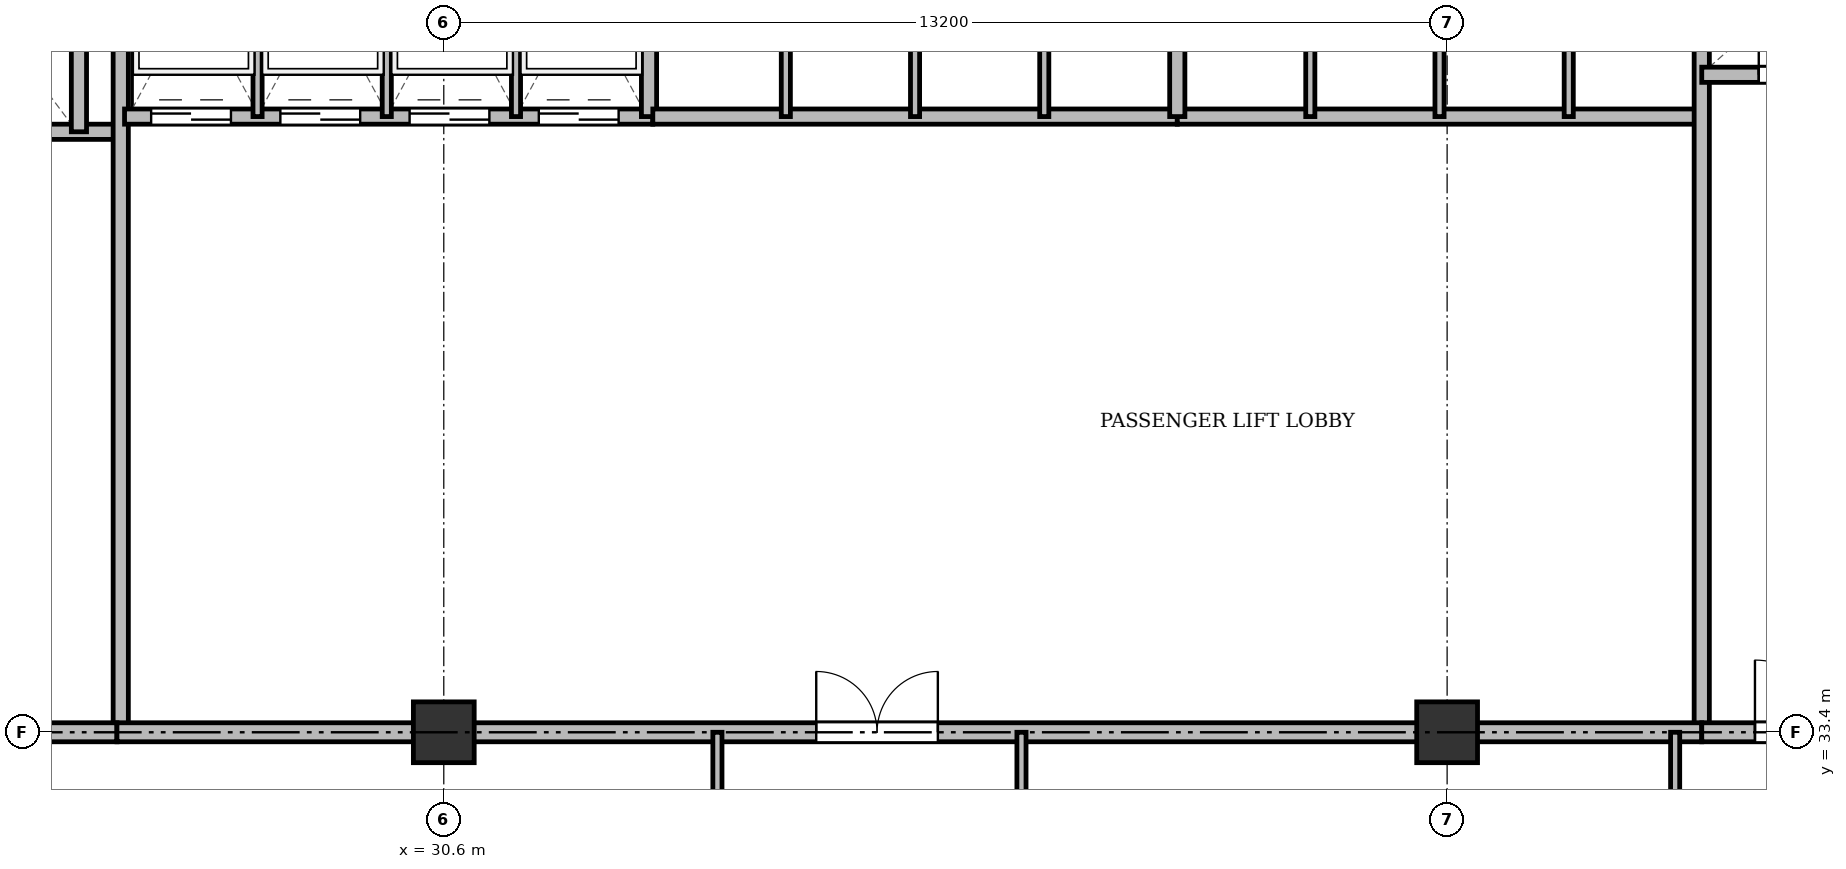
"""IFC4 building model, lengths in metres.
Left out: names, types, materials, properties, quantities, classifications, styles, units other than length and angle.
Written with IfcOpenShell. Run it as: python <this file> out.ifc"""

import sys

from ifc_helpers import new_model, si_unit, direction, frame, frame_2d, origin, origin_2d, place, context, subcontext, project, spatial, rectangle, extrude, source, transform, mapped, element, fill, save


model = new_model("IFC4")
c1 = context("Model", 3, precision=1e-05, world=origin(), true_north=direction((0.0, 1.0)))
c2 = subcontext(c1, "Body", "Model", "MODEL_VIEW")
j1 = project(units=[si_unit("LENGTHUNIT", "METRE"), si_unit("PLANEANGLEUNIT", "RADIAN")], contexts=[c1])
p1 = place(None, origin())
s1 = spatial("IfcSite", under=j1, at=p1, CompositionType="ELEMENT")
p2 = place(p1, origin())
s2 = spatial("IfcBuilding", under=s1, at=p2, CompositionType="ELEMENT")
p3 = place(p2, frame((0.0, 0.0, 121.3)))
s3 = spatial("IfcBuildingStorey", under=s2, at=p3, CompositionType="ELEMENT", Elevation=121.3)
m1 = source(origin(), c2, "Body", "SweptSolid", [
    extrude(rectangle(XDim=0.8, YDim=0.8, at=origin_2d()), origin(), (0.0, 0.0, 1.0), 3.6),
])
for number, where, z_axis, x_axis in (
    (1, (30.6, 33.4, 0.0), (0.0, 0.0, 1.0), (1.0, 0.0, 0.0)),
    (2, (43.8, 33.4, 0.0), (0.0, 0.0, 1.0), (1.0, 0.0, 0.0)),
):
    element("IfcColumn", number, at=place(p3, frame(where, z_axis=z_axis, x_axis=x_axis)), inside=s3, PredefinedType="COLUMN", context=c2, shape_type="MappedRepresentation", body=[
        mapped(m1, transform((0.0, 0.0, 0.0), x_axis=(1.0, 0.0, 0.0), y_axis=(0.0, 1.0, 0.0), z_axis=(0.0, 0.0, 1.0), scale=1.0)),
    ])
p4 = place(p3, frame((19.55, 41.3, 0.0), z_axis=(0.0, 0.0, 1.0), x_axis=(1.0, 0.0, 0.0)))
e3 = element("IfcWall", 3, at=p4, inside=s3, PredefinedType="SOLIDWALL", context=c2, shape_type="SweptSolid", body=[
    extrude(rectangle(XDim=6.75, YDim=0.2, at=frame_2d((3.375, 0.0))), origin(), (0.0, 0.0, 1.0), 3.34),
])
p5 = place(p4, frame((1.7, 0.0, 0.0)))
e4 = element("IfcOpeningElement", 4, at=p5, cuts=e3, PredefinedType="OPENING", context=c2, shape_type="SweptSolid", body=[
    extrude(rectangle(XDim=1.1, YDim=2.15, at=frame_2d((0.55, 1.075))), frame((0.0, 0.11, 0.0), z_axis=(0.0, -1.0, 0.0), x_axis=(1.0, 0.0, 0.0)), (0.0, 0.0, 1.0), 0.22),
])
p6 = place(p4, frame((4.4, 0.0, 0.0)))
e5 = element("IfcOpeningElement", 5, at=p6, cuts=e3, PredefinedType="OPENING", context=c2, shape_type="SweptSolid", body=[
    extrude(rectangle(XDim=1.1, YDim=2.15, at=frame_2d((0.55, 1.075))), frame((0.0, 0.11, 0.0), z_axis=(0.0, -1.0, 0.0), x_axis=(1.0, 0.0, 0.0)), (0.0, 0.0, 1.0), 0.22),
])
p7 = place(p3, frame((25.8, 41.3, 0.0), z_axis=(0.0, 0.0, 1.0), x_axis=(0.0, 1.0, 0.0)))
e6 = element("IfcWall", 6, at=p7, inside=s3, PredefinedType="SOLIDWALL", context=c2, shape_type="SweptSolid", body=[
    extrude(rectangle(XDim=3.4, YDim=0.2, at=frame_2d((1.7, 0.0))), origin(), (0.0, 0.0, 1.0), 3.34),
])
p8 = place(p3, frame((26.35, 33.4, 0.0), z_axis=(0.0, 0.0, 1.0), x_axis=(0.0, 1.0, 0.0)))
e7 = element("IfcWall", 7, at=p8, inside=s3, PredefinedType="SOLIDWALL", context=c2, shape_type="SweptSolid", body=[
    extrude(rectangle(XDim=11.3, YDim=0.2, at=frame_2d((5.65, 0.0))), origin(), (0.0, 0.0, 1.0), 2.752),
])
p9 = place(p3, frame((19.5, 33.4, 0.0), z_axis=(0.0, 0.0, 1.0), x_axis=(1.0, 0.0, 0.0)))
e8 = element("IfcWall", 8, at=p9, inside=s3, PredefinedType="PARTITIONING", context=c2, shape_type="SweptSolid", body=[
    extrude(rectangle(XDim=6.8, YDim=0.25, at=frame_2d((3.4, 0.0))), origin(), (0.0, 0.0, 1.0), 2.752),
])
p10 = place(p9, frame((0.75, 0.0, 0.0)))
e9 = element("IfcOpeningElement", 9, at=p10, cuts=e8, PredefinedType="OPENING", context=c2, shape_type="SweptSolid", body=[
    extrude(rectangle(XDim=1.6, YDim=2.2, at=frame_2d((0.8, 1.1))), frame((0.0, 0.135, 0.0), z_axis=(0.0, -1.0, 0.0), x_axis=(1.0, 0.0, 0.0)), (0.0, 0.0, 1.0), 0.27),
])
p11 = place(p3, frame((26.4, 41.5, 0.0), z_axis=(0.0, 0.0, 1.0), x_axis=(1.0, 0.0, 0.0)))
e10 = element("IfcWall", 10, at=p11, inside=s3, PredefinedType="SOLIDWALL", context=c2, shape_type="SweptSolid", body=[
    extrude(rectangle(XDim=6.95, YDim=0.2, at=frame_2d((3.475, 0.0))), origin(), (0.0, 0.0, 1.0), 3.34),
])
p12 = place(p11, frame((0.35, 0.0, 0.0)))
e11 = element("IfcOpeningElement", 11, at=p12, cuts=e10, PredefinedType="OPENING", context=c2, shape_type="SweptSolid", body=[
    extrude(rectangle(XDim=1.05, YDim=2.15, at=frame_2d((0.525, 1.075))), frame((0.0, 0.11, 0.0), z_axis=(0.0, -1.0, 0.0), x_axis=(1.0, 0.0, 0.0)), (0.0, 0.0, 1.0), 0.22),
])
p13 = place(p11, frame((2.05, 0.0, 0.0)))
e12 = element("IfcOpeningElement", 12, at=p13, cuts=e10, PredefinedType="OPENING", context=c2, shape_type="SweptSolid", body=[
    extrude(rectangle(XDim=1.05, YDim=2.15, at=frame_2d((0.525, 1.075))), frame((0.0, 0.11, 0.0), z_axis=(0.0, -1.0, 0.0), x_axis=(1.0, 0.0, 0.0)), (0.0, 0.0, 1.0), 0.22),
])
p14 = place(p11, frame((3.75, 0.0, 0.0)))
e13 = element("IfcOpeningElement", 13, at=p14, cuts=e10, PredefinedType="OPENING", context=c2, shape_type="SweptSolid", body=[
    extrude(rectangle(XDim=1.05, YDim=2.15, at=frame_2d((0.525, 1.075))), frame((0.0, 0.11, 0.0), z_axis=(0.0, -1.0, 0.0), x_axis=(1.0, 0.0, 0.0)), (0.0, 0.0, 1.0), 0.22),
])
p15 = place(p11, frame((5.45, 0.0, 0.0)))
e14 = element("IfcOpeningElement", 14, at=p15, cuts=e10, PredefinedType="OPENING", context=c2, shape_type="SweptSolid", body=[
    extrude(rectangle(XDim=1.05, YDim=2.15, at=frame_2d((0.525, 1.075))), frame((0.0, 0.11, 0.0), z_axis=(0.0, -1.0, 0.0), x_axis=(1.0, 0.0, 0.0)), (0.0, 0.0, 1.0), 0.22),
])
p16 = place(p3, frame((33.3, 41.5, 0.0), z_axis=(0.0, 0.0, 1.0), x_axis=(0.0, 1.0, 0.0)))
e15 = element("IfcWall", 15, at=p16, inside=s3, PredefinedType="SOLIDWALL", context=c2, shape_type="SweptSolid", body=[
    extrude(rectangle(XDim=3.2, YDim=0.2, at=frame_2d((1.6, 0.0))), origin(), (0.0, 0.0, 1.0), 3.34),
])
for number, where, z_axis, x_axis in (
    (16, (28.15, 41.5, 0.0), (0.0, 0.0, 1.0), (0.0, 1.0, 0.0)),
    (17, (29.85, 41.5, 0.0), (0.0, 0.0, 1.0), (0.0, 1.0, 0.0)),
    (18, (31.55, 41.5, 0.0), (0.0, 0.0, 1.0), (0.0, 1.0, 0.0)),
):
    element("IfcWall", number, at=place(p3, frame(where, z_axis=z_axis, x_axis=x_axis)), inside=s3, PredefinedType="PARTITIONING", context=c2, shape_type="SweptSolid", body=[
        extrude(rectangle(XDim=3.2, YDim=0.12, at=frame_2d((1.6, 0.0))), origin(), (0.0, 0.0, 1.0), 3.34),
    ])
p17 = place(p3, frame((33.35, 41.5, 0.0), z_axis=(0.0, 0.0, 1.0), x_axis=(1.0, 0.0, 0.0)))
e19 = element("IfcWall", 19, at=p17, inside=s3, PredefinedType="SOLIDWALL", context=c2, shape_type="SweptSolid", body=[
    extrude(rectangle(XDim=6.9, YDim=0.2, at=frame_2d((3.45, 0.0))), origin(), (0.0, 0.0, 1.0), 3.34),
])
for number, where, z_axis, x_axis in (
    (20, (35.1, 41.5, 0.0), (0.0, 0.0, 1.0), (0.0, 1.0, 0.0)),
    (21, (36.8, 41.5, 0.0), (0.0, 0.0, 1.0), (0.0, 1.0, 0.0)),
    (22, (38.5, 41.5, 0.0), (0.0, 0.0, 1.0), (0.0, 1.0, 0.0)),
):
    element("IfcWall", number, at=place(p3, frame(where, z_axis=z_axis, x_axis=x_axis)), inside=s3, PredefinedType="PARTITIONING", context=c2, shape_type="SweptSolid", body=[
        extrude(rectangle(XDim=3.2, YDim=0.12, at=frame_2d((1.6, 0.0))), origin(), (0.0, 0.0, 1.0), 3.34),
    ])
p18 = place(p3, frame((40.25, 41.5, 0.0), z_axis=(0.0, 0.0, 1.0), x_axis=(1.0, 0.0, 0.0)))
e23 = element("IfcWall", 23, at=p18, inside=s3, PredefinedType="SOLIDWALL", context=c2, shape_type="SweptSolid", body=[
    extrude(rectangle(XDim=6.9, YDim=0.2, at=frame_2d((3.45, 0.0))), origin(), (0.0, 0.0, 1.0), 2.84),
])
p19 = place(p3, frame((40.25, 41.5, 0.0), z_axis=(0.0, 0.0, 1.0), x_axis=(0.0, 1.0, 0.0)))
e24 = element("IfcWall", 24, at=p19, inside=s3, PredefinedType="SOLIDWALL", context=c2, shape_type="SweptSolid", body=[
    extrude(rectangle(XDim=3.2, YDim=0.2, at=frame_2d((1.6, 0.0))), origin(), (0.0, 0.0, 1.0), 3.34),
])
p20 = place(p3, frame((42.0, 41.5, 0.0), z_axis=(0.0, 0.0, 1.0), x_axis=(0.0, 1.0, 0.0)))
e25 = element("IfcWall", 25, at=p20, inside=s3, PredefinedType="PARTITIONING", context=c2, shape_type="SweptSolid", body=[
    extrude(rectangle(XDim=3.2, YDim=0.12, at=frame_2d((1.6, 0.0))), origin(), (0.0, 0.0, 1.0), 3.34),
])
p21 = place(p3, frame((43.7, 41.5, 0.0), z_axis=(0.0, 0.0, 1.0), x_axis=(0.0, 1.0, 0.0)))
e26 = element("IfcWall", 26, at=p21, inside=s3, PredefinedType="PARTITIONING", context=c2, shape_type="SweptSolid", body=[
    extrude(rectangle(XDim=3.2, YDim=0.12, at=frame_2d((1.6, 0.0))), origin(), (0.0, 0.0, 1.0), 2.84),
])
p22 = place(p3, frame((45.4, 41.5, 0.0), z_axis=(0.0, 0.0, 1.0), x_axis=(0.0, 1.0, 0.0)))
e27 = element("IfcWall", 27, at=p22, inside=s3, PredefinedType="PARTITIONING", context=c2, shape_type="SweptSolid", body=[
    extrude(rectangle(XDim=3.2, YDim=0.12, at=frame_2d((1.6, 0.0))), origin(), (0.0, 0.0, 1.0), 3.34),
])
p23 = place(p3, frame((47.15, 33.4, 0.0), z_axis=(0.0, 0.0, 1.0), x_axis=(0.0, 1.0, 0.0)))
e28 = element("IfcWall", 28, at=p23, inside=s3, PredefinedType="SOLIDWALL", context=c2, shape_type="SweptSolid", body=[
    extrude(rectangle(XDim=11.3, YDim=0.2, at=frame_2d((5.65, 0.0))), origin(), (0.0, 0.0, 1.0), 2.752),
])
p24 = place(p3, frame((26.3, 33.4, 0.0), z_axis=(0.0, 0.0, 1.0), x_axis=(1.0, 0.0, 0.0)))
e29 = element("IfcWall", 29, at=p24, inside=s3, PredefinedType="PARTITIONING", context=c2, shape_type="SweptSolid", body=[
    extrude(rectangle(XDim=20.85, YDim=0.25, at=frame_2d((10.425, 0.0))), origin(), (0.0, 0.0, 1.0), 2.752),
])
p25 = place(p24, frame((9.2, 0.0, 0.0)))
e30 = element("IfcOpeningElement", 30, at=p25, cuts=e29, PredefinedType="OPENING", context=c2, shape_type="SweptSolid", body=[
    extrude(rectangle(XDim=1.6, YDim=2.2, at=frame_2d((0.8, 1.1))), frame((0.0, 0.135, 0.0), z_axis=(0.0, -1.0, 0.0), x_axis=(1.0, 0.0, 0.0)), (0.0, 0.0, 1.0), 0.27),
])
p26 = place(p3, frame((47.15, 42.05, 0.0), z_axis=(0.0, 0.0, 1.0), x_axis=(1.0, 0.0, 0.0)))
e31 = element("IfcWall", 31, at=p26, inside=s3, PredefinedType="SOLIDWALL", context=c2, shape_type="SweptSolid", body=[
    extrude(rectangle(XDim=7.85, YDim=0.2, at=frame_2d((3.925, 0.0))), origin(), (0.0, 0.0, 1.0), 2.84),
])
p27 = place(p26, frame((0.75, 0.0, 0.0)))
e32 = element("IfcOpeningElement", 32, at=p27, cuts=e31, PredefinedType="OPENING", context=c2, shape_type="SweptSolid", body=[
    extrude(rectangle(XDim=0.9, YDim=2.1, at=frame_2d((0.45, 1.05))), frame((0.0, 0.11, 0.0), z_axis=(0.0, -1.0, 0.0), x_axis=(1.0, 0.0, 0.0)), (0.0, 0.0, 1.0), 0.22),
])
p28 = place(p26, frame((3.85, 0.0, 0.0)))
e33 = element("IfcOpeningElement", 33, at=p28, cuts=e31, PredefinedType="OPENING", context=c2, shape_type="SweptSolid", body=[
    extrude(rectangle(XDim=0.9, YDim=2.1, at=frame_2d((0.45, 1.05))), frame((0.0, 0.11, 0.0), z_axis=(0.0, -1.0, 0.0), x_axis=(1.0, 0.0, 0.0)), (0.0, 0.0, 1.0), 0.22),
])
p29 = place(p3, frame((47.15, 33.4, 0.0), z_axis=(0.0, 0.0, 1.0), x_axis=(1.0, 0.0, 0.0)))
e34 = element("IfcWall", 34, at=p29, inside=s3, PredefinedType="PARTITIONING", context=c2, shape_type="SweptSolid", body=[
    extrude(rectangle(XDim=11.15, YDim=0.25, at=frame_2d((5.575, 0.0))), origin(), (0.0, 0.0, 1.0), 2.752),
])
p30 = place(p29, frame((0.7, 0.0, 0.0)))
e35 = element("IfcOpeningElement", 35, at=p30, cuts=e34, PredefinedType="OPENING", context=c2, shape_type="SweptSolid", body=[
    extrude(rectangle(XDim=0.95, YDim=2.15, at=frame_2d((0.475, 1.075))), frame((0.0, 0.135, 0.0), z_axis=(0.0, -1.0, 0.0), x_axis=(1.0, 0.0, 0.0)), (0.0, 0.0, 1.0), 0.27),
])
p31 = place(p29, frame((6.0, 0.0, 0.0)))
e36 = element("IfcOpeningElement", 36, at=p31, cuts=e34, PredefinedType="OPENING", context=c2, shape_type="SweptSolid", body=[
    extrude(rectangle(XDim=1.2, YDim=2.15, at=frame_2d((0.6, 1.075))), frame((0.0, 0.135, 0.0), z_axis=(0.0, -1.0, 0.0), x_axis=(1.0, 0.0, 0.0)), (0.0, 0.0, 1.0), 0.27),
])
for number, where, z_axis, x_axis in (
    (37, (34.2, 29.8, 0.0), (0.0, 0.0, 1.0), (0.0, 1.0, 0.0)),
    (38, (38.2, 29.8, 0.0), (0.0, 0.0, 1.0), (0.0, 1.0, 0.0)),
    (39, (46.8, 29.8, 0.0), (0.0, 0.0, 1.0), (0.0, 1.0, 0.0)),
):
    element("IfcWall", number, at=place(p3, frame(where, z_axis=z_axis, x_axis=x_axis)), inside=s3, PredefinedType="PARTITIONING", context=c2, shape_type="SweptSolid", body=[
        extrude(rectangle(XDim=3.6, YDim=0.12, at=frame_2d((1.8, 0.0))), origin(), (0.0, 0.0, 1.0), 2.752),
    ])
m2 = source(origin(), c2, "Body", "SweptSolid", [
    extrude(rectangle(XDim=1.05, YDim=2.15, at=frame_2d((0.525, 1.075))), frame((0.0, 0.025, 0.0), z_axis=(0.0, -1.0, 0.0), x_axis=(1.0, 0.0, 0.0)), (0.0, 0.0, 1.0), 0.05),
])
p32 = place(p12, origin())
e40 = element("IfcDoor", 40, at=p32, inside=s3, OperationType="DOUBLE_DOOR_SLIDING", PredefinedType="DOOR", context=c2, shape_type="MappedRepresentation", body=[
    mapped(m2, transform((0.0, 0.0, 0.0), x_axis=(1.0, 0.0, 0.0), y_axis=(0.0, 1.0, 0.0), z_axis=(0.0, 0.0, 1.0), scale=1.0)),
])
fill(e11, e40)
p33 = place(p13, origin())
e41 = element("IfcDoor", 41, at=p33, inside=s3, OperationType="DOUBLE_DOOR_SLIDING", PredefinedType="DOOR", context=c2, shape_type="MappedRepresentation", body=[
    mapped(m2, transform((0.0, 0.0, 0.0), x_axis=(1.0, 0.0, 0.0), y_axis=(0.0, 1.0, 0.0), z_axis=(0.0, 0.0, 1.0), scale=1.0)),
])
fill(e12, e41)
p34 = place(p14, origin())
e42 = element("IfcDoor", 42, at=p34, inside=s3, OperationType="DOUBLE_DOOR_SLIDING", PredefinedType="DOOR", context=c2, shape_type="MappedRepresentation", body=[
    mapped(m2, transform((0.0, 0.0, 0.0), x_axis=(1.0, 0.0, 0.0), y_axis=(0.0, 1.0, 0.0), z_axis=(0.0, 0.0, 1.0), scale=1.0)),
])
fill(e13, e42)
p35 = place(p15, origin())
e43 = element("IfcDoor", 43, at=p35, inside=s3, OperationType="DOUBLE_DOOR_SLIDING", PredefinedType="DOOR", context=c2, shape_type="MappedRepresentation", body=[
    mapped(m2, transform((0.0, 0.0, 0.0), x_axis=(1.0, 0.0, 0.0), y_axis=(0.0, 1.0, 0.0), z_axis=(0.0, 0.0, 1.0), scale=1.0)),
])
fill(e14, e43)
m3 = source(origin(), c2, "Body", "SweptSolid", [
    extrude(rectangle(XDim=1.6, YDim=2.2, at=frame_2d((0.8, 1.1))), frame((0.0, 0.025, 0.0), z_axis=(0.0, -1.0, 0.0), x_axis=(1.0, 0.0, 0.0)), (0.0, 0.0, 1.0), 0.05),
])
p36 = place(p25, origin())
e44 = element("IfcDoor", 44, at=p36, inside=s3, OperationType="DOUBLE_DOOR_SINGLE_SWING", PredefinedType="DOOR", context=c2, shape_type="MappedRepresentation", body=[
    mapped(m3, transform((0.0, 0.0, 0.0), x_axis=(1.0, 0.0, 0.0), y_axis=(0.0, 1.0, 0.0), z_axis=(0.0, 0.0, 1.0), scale=1.0)),
])
fill(e30, e44)
m4 = source(origin(), c2, "Body", "SweptSolid", [
    extrude(rectangle(XDim=0.9, YDim=2.1, at=frame_2d((0.45, 1.05))), frame((0.0, 0.025, 0.0), z_axis=(0.0, -1.0, 0.0), x_axis=(1.0, 0.0, 0.0)), (0.0, 0.0, 1.0), 0.05),
])
p37 = place(p27, origin())
e45 = element("IfcDoor", 45, at=p37, inside=s3, OperationType="SINGLE_SWING_LEFT", PredefinedType="DOOR", context=c2, shape_type="MappedRepresentation", body=[
    mapped(m4, transform((0.0, 0.0, 0.0), x_axis=(1.0, 0.0, 0.0), y_axis=(0.0, 1.0, 0.0), z_axis=(0.0, 0.0, 1.0), scale=1.0)),
])
fill(e32, e45)
m5 = source(origin(), c2, "Body", "SweptSolid", [
    extrude(rectangle(XDim=0.95, YDim=2.15, at=frame_2d((0.475, 1.075))), frame((0.0, 0.025, 0.0), z_axis=(0.0, -1.0, 0.0), x_axis=(1.0, 0.0, 0.0)), (0.0, 0.0, 1.0), 0.05),
])
p38 = place(p30, origin())
e46 = element("IfcDoor", 46, at=p38, inside=s3, OperationType="SINGLE_SWING_LEFT", PredefinedType="DOOR", context=c2, shape_type="MappedRepresentation", body=[
    mapped(m5, transform((0.0, 0.0, 0.0), x_axis=(1.0, 0.0, 0.0), y_axis=(0.0, 1.0, 0.0), z_axis=(0.0, 0.0, 1.0), scale=1.0)),
])
fill(e35, e46)
save(model, sys.argv[1])
